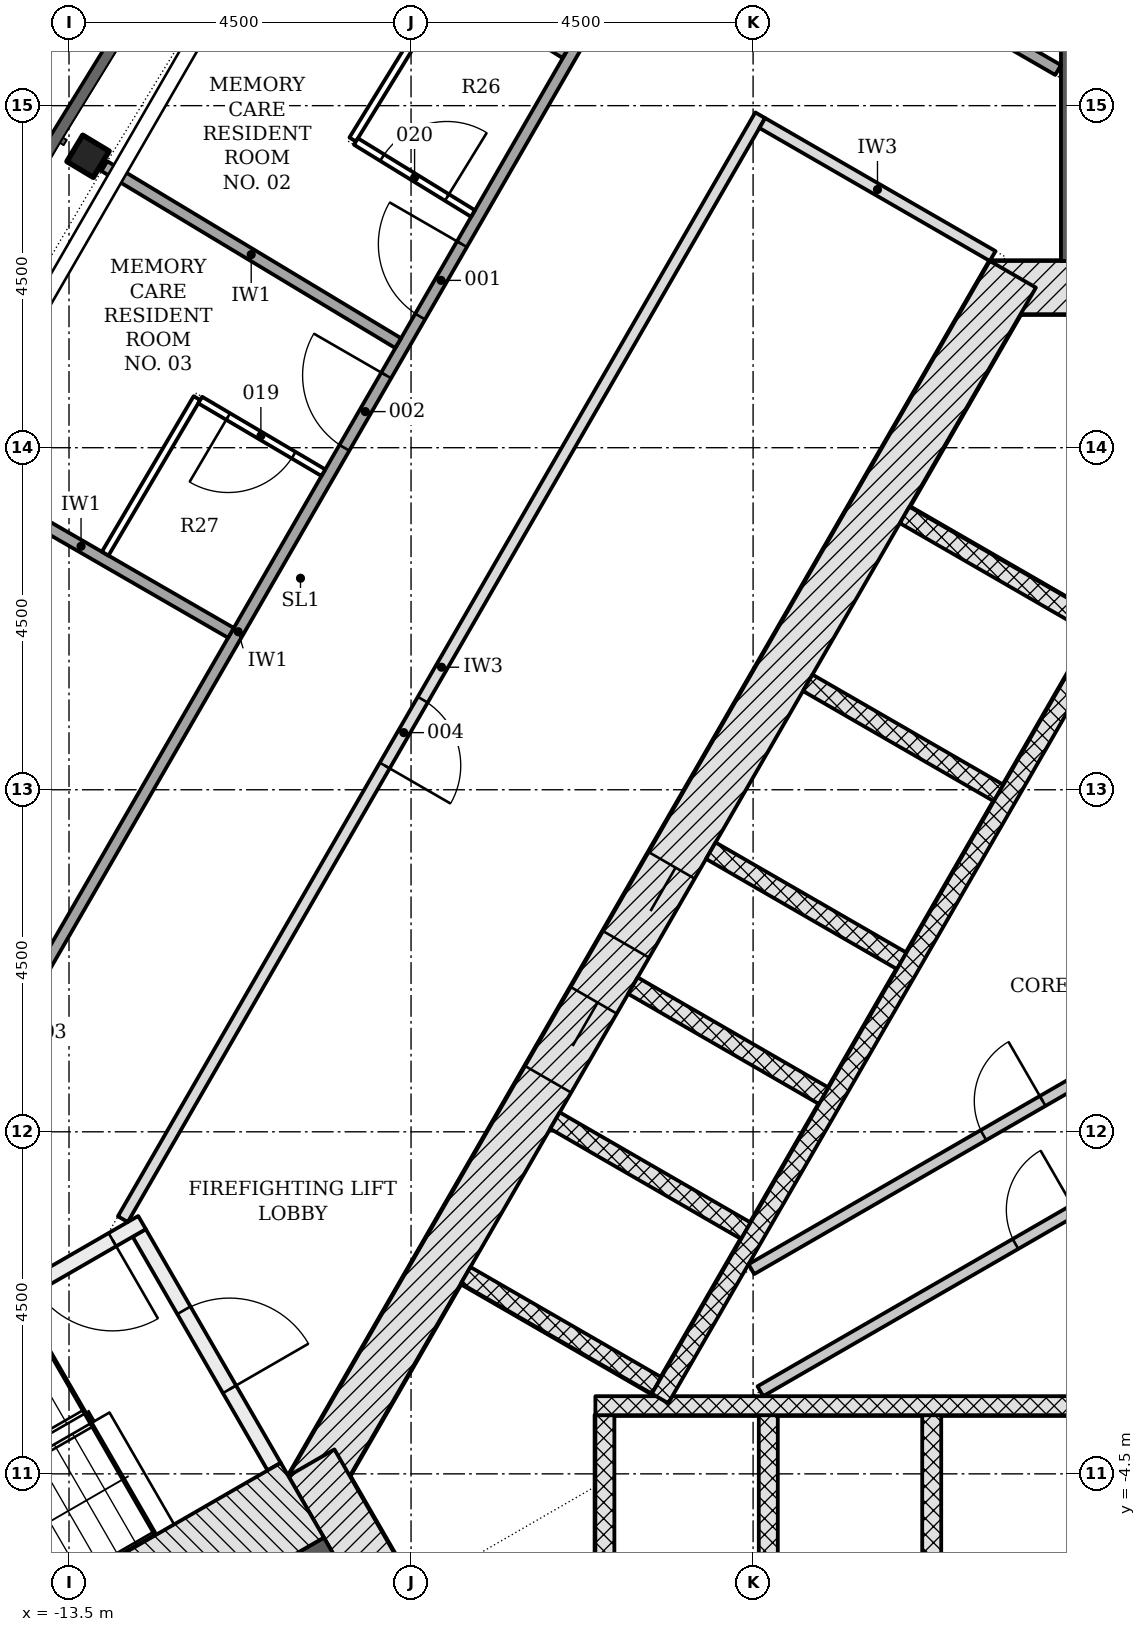
"""IFC4 building model, lengths in metres.
Left out: names, types, materials, properties, quantities, classifications, styles, units other than length and angle.
Written with IfcOpenShell. Run it as: python <this file> out.ifc"""

import sys

from ifc_helpers import new_model, si_unit, direction, frame, frame_2d, origin, origin_2d, place, context, subcontext, project, spatial, rectangle, i_section, extrude, element, fill, save


model = new_model("IFC4")
c1 = context("Model", 3, precision=1e-05, world=origin(), true_north=direction((0.0, 1.0)))
c2 = subcontext(c1, "Body", "Model", "MODEL_VIEW")
j1 = project(units=[si_unit("LENGTHUNIT", "METRE"), si_unit("PLANEANGLEUNIT", "RADIAN")], contexts=[c1])
p1 = place(None, origin())
s1 = spatial("IfcSite", under=j1, at=p1, CompositionType="ELEMENT")
p2 = place(p1, origin())
s2 = spatial("IfcBuilding", under=s1, at=p2, CompositionType="ELEMENT")
p3 = place(p2, frame((0.0, 0.0, 27.6)))
s3 = spatial("IfcBuildingStorey", under=s2, at=p3, CompositionType="ELEMENT", Elevation=27.6)
p4 = place(p3, frame((1.386, 11.106, -0.2), z_axis=(0.0, 0.0, 1.0), x_axis=(-1.0, 0.0, 0.0)))
e1 = element("IfcWall", 1, at=p4, inside=s3, PredefinedType="SHEAR", context=c2, shape_type="SweptSolid", body=[
    extrude(rectangle(XDim=2.771, YDim=0.7, at=frame_2d((1.386, 0.0))), origin(), (0.0, 0.0, 1.0), 3.6),
])
p5 = place(p3, frame((-1.083, 11.281, -0.2), z_axis=(0.0, 0.0, 1.0), x_axis=(-0.500001446645, -0.866024568562, 0.0)))
e2 = element("IfcWall", 2, at=p5, inside=s3, PredefinedType="SHEAR", context=c2, shape_type="SweptSolid", body=[
    extrude(rectangle(XDim=18.458, YDim=0.7, at=frame_2d((9.229, 0.0))), origin(), (0.0, 0.0, 1.0), 3.6),
])
p6 = place(p5, frame((8.979, 0.0, 0.2)))
e3 = element("IfcOpeningElement", 3, at=p6, cuts=e2, PredefinedType="OPENING", context=c2, shape_type="SweptSolid", body=[
    extrude(rectangle(XDim=1.2, YDim=2.1, at=frame_2d((0.6, 1.05))), frame((0.0, 0.36, 0.0), z_axis=(0.0, -1.0, 0.0), x_axis=(1.0, 0.0, 0.0)), (0.0, 0.0, 1.0), 0.72),
])
p7 = place(p5, frame((11.029, 0.0, 0.2)))
e4 = element("IfcOpeningElement", 4, at=p7, cuts=e2, PredefinedType="OPENING", context=c2, shape_type="SweptSolid", body=[
    extrude(rectangle(XDim=1.2, YDim=2.1, at=frame_2d((0.6, 1.05))), frame((0.0, 0.36, 0.0), z_axis=(0.0, -1.0, 0.0), x_axis=(1.0, 0.0, 0.0)), (0.0, 0.0, 1.0), 0.72),
])
p8 = place(p3, frame((-10.311, -4.353, -0.2), z_axis=(0.0, 0.0, 1.0), x_axis=(0.500042739161, -0.866000726912, 0.0)))
e5 = element("IfcWall", 5, at=p8, inside=s3, PredefinedType="SHEAR", context=c2, shape_type="SweptSolid", body=[
    extrude(rectangle(XDim=2.771, YDim=0.7, at=frame_2d((1.386, 0.0))), origin(), (0.0, 0.0, 1.0), 3.6),
])
p9 = place(p3, frame((0.0, 11.456, -0.2), z_axis=(0.0, 0.0, 1.0), x_axis=(0.0, 1.0, 0.0)))
e6 = element("IfcWall", 6, at=p9, inside=s3, PredefinedType="SHEAR", context=c2, shape_type="SweptSolid", body=[
    extrude(rectangle(XDim=14.633, YDim=0.9, at=frame_2d((7.316, 0.0))), origin(), (0.0, 0.0, 1.0), 3.6),
])
p10 = place(p3, frame((-9.922, -5.728, -0.2), z_axis=(0.0, 0.0, 1.0), x_axis=(-0.866028046028, -0.499995423472, 0.0)))
e7 = element("IfcWall", 7, at=p10, inside=s3, PredefinedType="SHEAR", context=c2, shape_type="SweptSolid", body=[
    extrude(rectangle(XDim=14.633, YDim=0.9, at=frame_2d((7.316, 0.0))), origin(), (0.0, 0.0, 1.0), 3.6),
])
p11 = place(p3, frame((-13.25, 12.834, -0.2), z_axis=(0.0, 0.0, 1.0), x_axis=(-0.515981163775, -0.856599929156, 0.0)))
e8 = element("IfcColumn", 8, at=p11, inside=s3, PredefinedType="COLUMN", context=c2, shape_type="SweptSolid", body=[
    extrude(i_section(OverallWidth=0.404, OverallDepth=0.406, WebThickness=0.027, FlangeThickness=0.044, FilletRadius=0.015, at=origin_2d()), origin(), (0.0, 0.0, 1.0), 3.6),
])
for number, where, z_axis, x_axis in (
    (9, (-6.45, -6.228, -0.2), (0.0, 0.0, 1.0), (0.0, 1.0, 0.0)),
    (10, (-4.3, -6.228, -0.2), (0.0, 0.0, 1.0), (0.0, 1.0, 0.0)),
    (11, (-2.15, -6.228, -0.2), (0.0, 0.0, 1.0), (0.0, 1.0, 0.0)),
):
    element("IfcWall", number, at=place(p3, frame(where, z_axis=z_axis, x_axis=x_axis)), inside=s3, PredefinedType="PARTITIONING", context=c2, shape_type="SweptSolid", body=[
        extrude(rectangle(XDim=2.5, YDim=0.25, at=frame_2d((1.25, 0.0))), origin(), (0.0, 0.0, 1.0), 3.6),
    ])
p12 = place(p3, frame((-6.575, -3.603, 0.0), z_axis=(0.0, 0.0, 1.0), x_axis=(1.0, 0.0, 0.0)))
e12 = element("IfcWall", 12, at=p12, inside=s3, PredefinedType="PARTITIONING", context=c2, shape_type="SweptSolid", body=[
    extrude(rectangle(XDim=13.15, YDim=0.25, at=frame_2d((6.575, 0.0))), origin(), (0.0, 0.0, 1.0), 3.4),
])
p13 = place(p3, frame((-2.506, 8.115, -0.2), z_axis=(0.0, 0.0, 1.0), x_axis=(0.865996321171, -0.50005036918, 0.0)))
e13 = element("IfcWall", 13, at=p13, inside=s3, PredefinedType="PARTITIONING", context=c2, shape_type="SweptSolid", body=[
    extrude(rectangle(XDim=2.9, YDim=0.25, at=frame_2d((1.45, 0.0))), origin(), (0.0, 0.0, 1.0), 3.6),
])
for number, where, z_axis, x_axis in (
    (14, (-3.781, 5.907, -0.2), (0.0, 0.0, 1.0), (0.866, -0.5, 0.0)),
    (15, (-5.056, 3.699, -0.2), (0.0, 0.0, 1.0), (0.866, -0.5, 0.0)),
    (16, (-6.081, 1.923, -0.2), (0.0, 0.0, 1.0), (0.866, -0.5, 0.0)),
    (17, (-7.106, 0.148, -0.2), (0.0, 0.0, 1.0), (0.866, -0.5, 0.0)),
    (18, (-8.281, -1.887, -0.2), (0.0, 0.0, 1.0), (0.866, -0.5, 0.0)),
):
    element("IfcWall", number, at=place(p3, frame(where, z_axis=z_axis, x_axis=x_axis)), inside=s3, PredefinedType="PARTITIONING", context=c2, shape_type="SweptSolid", body=[
        extrude(rectangle(XDim=2.9, YDim=0.25, at=frame_2d((1.45, 0.0))), origin(), (0.0, 0.0, 1.0), 3.6),
    ])
p14 = place(p3, frame((0.176, 6.711, 0.0), z_axis=(0.0, 0.0, 1.0), x_axis=(-0.500004227369, -0.866022963098, 0.0)))
e19 = element("IfcWall", 19, at=p14, inside=s3, PredefinedType="PARTITIONING", context=c2, shape_type="SweptSolid", body=[
    extrude(rectangle(XDim=11.8, YDim=0.25, at=frame_2d((5.9, 0.0))), origin(), (0.0, 0.0, 1.0), 3.4),
])
p15 = place(p3, frame((-4.523, -1.807, 0.0), z_axis=(0.0, 0.0, 1.0), x_axis=(0.866030300338, 0.499991518824, 0.0)))
e20 = element("IfcWall", 20, at=p15, inside=s3, PredefinedType="PARTITIONING", context=c2, shape_type="SweptSolid", body=[
    extrude(rectangle(XDim=11.049, YDim=0.15, at=frame_2d((5.524, 0.0))), origin(), (0.0, 0.0, 1.0), 3.4),
])
p16 = place(p15, frame((3.525, 0.0, 0.0)))
e21 = element("IfcOpeningElement", 21, at=p16, cuts=e20, PredefinedType="OPENING", context=c2, shape_type="SweptSolid", body=[
    extrude(rectangle(XDim=0.9, YDim=2.1, at=frame_2d((0.45, 1.05))), frame((0.0, 0.085, 0.0), z_axis=(0.0, -1.0, 0.0), x_axis=(1.0, 0.0, 0.0)), (0.0, 0.0, 1.0), 0.17),
])
p17 = place(p3, frame((-4.404, -3.413, 0.0), z_axis=(0.0, 0.0, 1.0), x_axis=(0.866022252853, 0.500005457533, 0.0)))
e22 = element("IfcWall", 22, at=p17, inside=s3, PredefinedType="PARTITIONING", context=c2, shape_type="SweptSolid", body=[
    extrude(rectangle(XDim=11.749, YDim=0.15, at=frame_2d((5.875, 0.0))), origin(), (0.0, 0.0, 1.0), 3.4),
])
p18 = place(p17, frame((3.875, 0.0, 0.0)))
e23 = element("IfcOpeningElement", 23, at=p18, cuts=e22, PredefinedType="OPENING", context=c2, shape_type="SweptSolid", body=[
    extrude(rectangle(XDim=0.9, YDim=2.1, at=frame_2d((0.45, 1.05))), frame((0.0, 0.085, 0.0), z_axis=(0.0, -1.0, 0.0), x_axis=(1.0, 0.0, 0.0)), (0.0, 0.0, 1.0), 0.17),
])
p19 = place(p3, frame((-12.576, -1.331, -0.2), z_axis=(0.0, 0.0, 1.0), x_axis=(0.499970499736, -0.8660424351, 0.0)))
e24 = element("IfcWall", 24, at=p19, inside=s3, PredefinedType="SHEAR", context=c2, shape_type="SweptSolid", body=[
    extrude(rectangle(XDim=3.55, YDim=0.2, at=frame_2d((1.775, 0.0))), origin(), (0.0, 0.0, 1.0), 3.6),
])
p20 = place(p19, frame((1.175, 0.0, 0.2)))
e25 = element("IfcOpeningElement", 25, at=p20, cuts=e24, PredefinedType="OPENING", context=c2, shape_type="SweptSolid", body=[
    extrude(rectangle(XDim=1.2, YDim=2.1, at=frame_2d((0.6, 1.05))), frame((0.0, 0.11, 0.0), z_axis=(0.0, -1.0, 0.0), x_axis=(1.0, 0.0, 0.0)), (0.0, 0.0, 1.0), 0.22),
])
p21 = place(p3, frame((-12.539, -1.194, -0.2), z_axis=(0.0, 0.0, 1.0), x_axis=(-0.866045472092, -0.499965239061, 0.0)))
e26 = element("IfcWall", 26, at=p21, inside=s3, PredefinedType="SHEAR", context=c2, shape_type="SweptSolid", body=[
    extrude(rectangle(XDim=5.6, YDim=0.2, at=frame_2d((2.8, 0.0))), origin(), (0.0, 0.0, 1.0), 3.6),
])
p22 = place(p21, frame((0.45, 0.0, 0.2)))
e27 = element("IfcOpeningElement", 27, at=p22, cuts=e26, PredefinedType="OPENING", context=c2, shape_type="SweptSolid", body=[
    extrude(rectangle(XDim=1.2, YDim=2.1, at=frame_2d((0.6, 1.05))), frame((0.0, 0.11, 0.0), z_axis=(0.0, -1.0, 0.0), x_axis=(1.0, 0.0, 0.0)), (0.0, 0.0, 1.0), 0.22),
])
p23 = place(p3, frame((-10.43, -4.847, -0.2), z_axis=(0.0, 0.0, 1.0), x_axis=(-0.866018442252, -0.500012057535, 0.0)))
e28 = element("IfcWall", 28, at=p23, inside=s3, PredefinedType="SHEAR", context=c2, shape_type="SweptSolid", body=[
    extrude(rectangle(XDim=7.2, YDim=1.136, at=frame_2d((3.6, 0.0))), origin(), (0.0, 0.0, 1.0), 3.6),
])
p24 = place(p3, frame((-17.208, -3.699, 0.0), z_axis=(0.0, 0.0, 1.0), x_axis=(0.499997567621, 0.866026808115, 0.0)))
e29 = element("IfcWall", 29, at=p24, inside=s3, PredefinedType="PARTITIONING", context=c2, shape_type="SweptSolid", body=[
    extrude(rectangle(XDim=23.736, YDim=0.15, at=frame_2d((11.868, 0.0))), origin(), (0.0, 0.0, 1.0), 2.768),
])
p25 = place(p24, frame((16.656, 0.0, 0.0)))
e30 = element("IfcOpeningElement", 30, at=p25, cuts=e29, PredefinedType="OPENING", context=c2, shape_type="SweptSolid", body=[
    extrude(rectangle(XDim=1.1, YDim=2.1, at=frame_2d((0.55, 1.05))), frame((0.0, 0.085, 0.0), z_axis=(0.0, -1.0, 0.0), x_axis=(1.0, 0.0, 0.0)), (0.0, 0.0, 1.0), 0.17),
])
p26 = place(p24, frame((14.662, 0.0, 0.0)))
e31 = element("IfcOpeningElement", 31, at=p26, cuts=e29, PredefinedType="OPENING", context=c2, shape_type="SweptSolid", body=[
    extrude(rectangle(XDim=1.1, YDim=2.1, at=frame_2d((0.55, 1.05))), frame((0.0, 0.085, 0.0), z_axis=(0.0, -1.0, 0.0), x_axis=(1.0, 0.0, 0.0)), (0.0, 0.0, 1.0), 0.17),
])
p27 = place(p24, frame((5.273, 0.0, 0.0)))
e32 = element("IfcOpeningElement", 32, at=p27, cuts=e29, PredefinedType="OPENING", context=c2, shape_type="SweptSolid", body=[
    extrude(rectangle(XDim=1.0, YDim=2.1, at=frame_2d((0.5, 1.05))), frame((0.0, 0.085, 0.0), z_axis=(0.0, -1.0, 0.0), x_axis=(1.0, 0.0, 0.0)), (0.0, 0.0, 1.0), 0.17),
])
p28 = place(p3, frame((-4.407, 13.374, 0.0), z_axis=(0.0, 0.0, 1.0), x_axis=(-0.499997181693, -0.866027030928, 0.0)))
e33 = element("IfcWall", 33, at=p28, inside=s3, PredefinedType="PARTITIONING", context=c2, shape_type="SweptSolid", body=[
    extrude(rectangle(XDim=16.77, YDim=0.15, at=frame_2d((8.385, 0.0))), origin(), (0.0, 0.0, 1.0), 2.768),
])
p29 = place(p28, frame((8.879, 0.0, 0.0)))
e34 = element("IfcOpeningElement", 34, at=p29, cuts=e33, PredefinedType="OPENING", context=c2, shape_type="SweptSolid", body=[
    extrude(rectangle(XDim=1.0, YDim=2.1, at=frame_2d((0.5, 1.05))), frame((0.0, 0.085, 0.0), z_axis=(0.0, -1.0, 0.0), x_axis=(1.0, 0.0, 0.0)), (0.0, 0.0, 1.0), 0.17),
])
p30 = place(p3, frame((-5.312, 16.755, 0.0), z_axis=(0.0, 0.0, 1.0), x_axis=(0.866028693448, -0.499994302092, 0.0)))
e35 = element("IfcWall", 35, at=p30, inside=s3, PredefinedType="PARTITIONING", context=c2, shape_type="SweptSolid", body=[
    extrude(rectangle(XDim=5.571, YDim=0.15, at=frame_2d((2.786, 0.0))), origin(), (0.0, 0.0, 1.0), 3.4),
])
p31 = place(p30, frame((2.045, 0.0, 0.0)))
e36 = element("IfcOpeningElement", 36, at=p31, cuts=e35, PredefinedType="OPENING", context=c2, shape_type="SweptSolid", body=[
    extrude(rectangle(XDim=1.5, YDim=2.1, at=frame_2d((0.75, 1.05))), frame((0.0, 0.085, 0.0), z_axis=(0.0, -1.0, 0.0), x_axis=(1.0, 0.0, 0.0)), (0.0, 0.0, 1.0), 0.17),
])
p32 = place(p3, frame((-4.379, 13.271, 0.0), z_axis=(0.0, 0.0, 1.0), x_axis=(0.866019471182, -0.500010275428, 0.0)))
e37 = element("IfcWall", 37, at=p32, inside=s3, PredefinedType="PARTITIONING", context=c2, shape_type="SweptSolid", body=[
    extrude(rectangle(XDim=3.5, YDim=0.15, at=frame_2d((1.75, 0.0))), origin(), (0.0, 0.0, 1.0), 3.4),
])
p33 = place(p3, frame((-15.314, 8.842, 0.0), z_axis=(0.0, 0.0, 1.0), x_axis=(0.866031166731, -0.499990018151, 0.0)))
e38 = element("IfcWall", 38, at=p33, inside=s3, PredefinedType="PARTITIONING", context=c2, shape_type="SweptSolid", body=[
    extrude(rectangle(XDim=4.555, YDim=0.15, at=frame_2d((2.277, 0.0))), origin(), (0.0, 0.0, 1.0), 2.768),
])
p34 = place(p3, frame((-13.036, 12.705, 0.0), z_axis=(0.0, 0.0, 1.0), x_axis=(0.856594224171, -0.515990634719, 0.0)))
e39 = element("IfcWall", 39, at=p34, inside=s3, PredefinedType="PARTITIONING", context=c2, shape_type="SweptSolid", body=[
    extrude(rectangle(XDim=4.513, YDim=0.15, at=frame_2d((2.256, 0.0))), origin(), (0.0, 0.0, 1.0), 2.768),
])
p35 = place(p3, frame((-10.686, 16.525, 0.0), z_axis=(0.0, 0.0, 1.0), x_axis=(0.846871345174, -0.531797823165, 0.0)))
e40 = element("IfcWall", 40, at=p35, inside=s3, PredefinedType="PARTITIONING", context=c2, shape_type="SweptSolid", body=[
    extrude(rectangle(XDim=4.389, YDim=0.15, at=frame_2d((2.194, 0.0))), origin(), (0.0, 0.0, 1.0), 2.768),
])
for number, where, z_axis, x_axis in (
    (41, (-8.523, 15.078, 0.0), (0.0, 0.0, 1.0), (-0.524, -0.852, 0.0)),
    (42, (-13.024, 7.606, 0.0), (0.0, 0.0, 1.0), (0.508, 0.861, 0.0)),
):
    element("IfcWall", number, at=place(p3, frame(where, z_axis=z_axis, x_axis=x_axis)), inside=s3, PredefinedType="PARTITIONING", context=c2, shape_type="SweptSolid", body=[
        extrude(rectangle(XDim=2.375, YDim=0.1, at=frame_2d((1.188, 0.0))), origin(), (0.0, 0.0, 1.0), 2.768),
    ])
p36 = place(p3, frame((-10.153, 8.671, 0.0), z_axis=(0.0, 0.0, 1.0), x_axis=(-0.861326599867, 0.508051659147, 0.0)))
e43 = element("IfcWall", 43, at=p36, inside=s3, PredefinedType="PARTITIONING", context=c2, shape_type="SweptSolid", body=[
    extrude(rectangle(XDim=1.882, YDim=0.1, at=frame_2d((0.941, 0.0))), origin(), (0.0, 0.0, 1.0), 3.4),
])
p37 = place(p36, frame((0.455, 0.0, 0.0)))
e44 = element("IfcOpeningElement", 44, at=p37, cuts=e43, PredefinedType="OPENING", context=c2, shape_type="SweptSolid", body=[
    extrude(rectangle(XDim=1.0, YDim=2.1, at=frame_2d((0.5, 1.05))), frame((0.0, 0.06, 0.0), z_axis=(0.0, -1.0, 0.0), x_axis=(1.0, 0.0, 0.0)), (0.0, 0.0, 1.0), 0.12),
])
p38 = place(p3, frame((-9.725, 13.029, 0.0), z_axis=(0.0, 0.0, 1.0), x_axis=(0.851755692017, -0.523939157839, 0.0)))
e45 = element("IfcWall", 45, at=p38, inside=s3, PredefinedType="PARTITIONING", context=c2, shape_type="SweptSolid", body=[
    extrude(rectangle(XDim=1.808, YDim=0.1, at=frame_2d((0.904, 0.0))), origin(), (0.0, 0.0, 1.0), 3.4),
])
p39 = place(p38, frame((0.406, 0.0, 0.0)))
e46 = element("IfcOpeningElement", 46, at=p39, cuts=e45, PredefinedType="OPENING", context=c2, shape_type="SweptSolid", body=[
    extrude(rectangle(XDim=1.0, YDim=2.1, at=frame_2d((0.5, 1.05))), frame((0.0, 0.06, 0.0), z_axis=(0.0, -1.0, 0.0), x_axis=(1.0, 0.0, 0.0)), (0.0, 0.0, 1.0), 0.12),
])
p40 = place(p6, origin())
e47 = element("IfcDoor", 47, at=p40, inside=s3, OperationType="DOUBLE_DOOR_SLIDING", PredefinedType="DOOR", context=c2, shape_type="SweptSolid", body=[
    extrude(rectangle(XDim=1.2, YDim=2.1, at=frame_2d((0.6, 1.05))), frame((0.0, 0.025, 0.0), z_axis=(0.0, -1.0, 0.0), x_axis=(1.0, 0.0, 0.0)), (0.0, 0.0, 1.0), 0.05),
])
fill(e3, e47)
p41 = place(p7, origin())
e48 = element("IfcDoor", 48, at=p41, inside=s3, OperationType="DOUBLE_DOOR_SLIDING", PredefinedType="DOOR", context=c2, shape_type="SweptSolid", body=[
    extrude(rectangle(XDim=1.2, YDim=2.1, at=frame_2d((0.6, 1.05))), frame((0.0, 0.025, 0.0), z_axis=(0.0, -1.0, 0.0), x_axis=(1.0, 0.0, 0.0)), (0.0, 0.0, 1.0), 0.05),
])
fill(e4, e48)
p42 = place(p18, origin())
e49 = element("IfcDoor", 49, at=p42, inside=s3, OperationType="SINGLE_SWING_RIGHT", PredefinedType="DOOR", context=c2, shape_type="SweptSolid", body=[
    extrude(rectangle(XDim=0.9, YDim=2.1, at=frame_2d((0.45, 1.05))), frame((0.0, 0.025, 0.0), z_axis=(0.0, -1.0, 0.0), x_axis=(1.0, 0.0, 0.0)), (0.0, 0.0, 1.0), 0.05),
])
fill(e23, e49)
p43 = place(p16, origin())
e50 = element("IfcDoor", 50, at=p43, inside=s3, OperationType="SINGLE_SWING_RIGHT", PredefinedType="DOOR", context=c2, shape_type="SweptSolid", body=[
    extrude(rectangle(XDim=0.9, YDim=2.1, at=frame_2d((0.45, 1.05))), frame((0.0, 0.025, 0.0), z_axis=(0.0, -1.0, 0.0), x_axis=(1.0, 0.0, 0.0)), (0.0, 0.0, 1.0), 0.05),
])
fill(e21, e50)
p44 = place(p20, origin())
e51 = element("IfcDoor", 51, at=p44, inside=s3, OperationType="SINGLE_SWING_RIGHT", PredefinedType="DOOR", context=c2, shape_type="SweptSolid", body=[
    extrude(rectangle(XDim=1.2, YDim=2.1, at=frame_2d((0.6, 1.05))), frame((0.0, 0.025, 0.0), z_axis=(0.0, -1.0, 0.0), x_axis=(1.0, 0.0, 0.0)), (0.0, 0.0, 1.0), 0.05),
])
fill(e25, e51)
p45 = place(p22, origin())
e52 = element("IfcDoor", 52, at=p45, inside=s3, OperationType="SINGLE_SWING_LEFT", PredefinedType="DOOR", context=c2, shape_type="SweptSolid", body=[
    extrude(rectangle(XDim=1.2, YDim=2.1, at=frame_2d((0.6, 1.05))), frame((0.0, 0.025, 0.0), z_axis=(0.0, -1.0, 0.0), x_axis=(1.0, 0.0, 0.0)), (0.0, 0.0, 1.0), 0.05),
])
fill(e27, e52)
p46 = place(p25, origin())
e53 = element("IfcDoor", 53, at=p46, inside=s3, OperationType="SINGLE_SWING_RIGHT", PredefinedType="DOOR", context=c2, shape_type="SweptSolid", body=[
    extrude(rectangle(XDim=1.1, YDim=2.1, at=frame_2d((0.55, 1.05))), frame((0.0, 0.025, 0.0), z_axis=(0.0, -1.0, 0.0), x_axis=(1.0, 0.0, 0.0)), (0.0, 0.0, 1.0), 0.05),
])
fill(e30, e53)
p47 = place(p26, origin())
e54 = element("IfcDoor", 54, at=p47, inside=s3, OperationType="SINGLE_SWING_RIGHT", PredefinedType="DOOR", context=c2, shape_type="SweptSolid", body=[
    extrude(rectangle(XDim=1.1, YDim=2.1, at=frame_2d((0.55, 1.05))), frame((0.0, 0.025, 0.0), z_axis=(0.0, -1.0, 0.0), x_axis=(1.0, 0.0, 0.0)), (0.0, 0.0, 1.0), 0.05),
])
fill(e31, e54)
p48 = place(p29, origin())
e55 = element("IfcDoor", 55, at=p48, inside=s3, OperationType="SINGLE_SWING_RIGHT", PredefinedType="DOOR", context=c2, shape_type="SweptSolid", body=[
    extrude(rectangle(XDim=1.0, YDim=2.1, at=frame_2d((0.5, 1.05))), frame((0.0, 0.025, 0.0), z_axis=(0.0, -1.0, 0.0), x_axis=(1.0, 0.0, 0.0)), (0.0, 0.0, 1.0), 0.05),
])
fill(e34, e55)
p49 = place(p37, origin())
e56 = element("IfcDoor", 56, at=p49, inside=s3, OperationType="SINGLE_SWING_RIGHT", PredefinedType="DOOR", context=c2, shape_type="SweptSolid", body=[
    extrude(rectangle(XDim=1.0, YDim=2.1, at=frame_2d((0.5, 1.05))), frame((0.0, 0.025, 0.0), z_axis=(0.0, -1.0, 0.0), x_axis=(1.0, 0.0, 0.0)), (0.0, 0.0, 1.0), 0.05),
])
fill(e44, e56)
p50 = place(p39, origin())
e57 = element("IfcDoor", 57, at=p50, inside=s3, OperationType="SINGLE_SWING_RIGHT", PredefinedType="DOOR", context=c2, shape_type="SweptSolid", body=[
    extrude(rectangle(XDim=1.0, YDim=2.1, at=frame_2d((0.5, 1.05))), frame((0.0, 0.025, 0.0), z_axis=(0.0, -1.0, 0.0), x_axis=(1.0, 0.0, 0.0)), (0.0, 0.0, 1.0), 0.05),
])
fill(e46, e57)
save(model, sys.argv[1])
